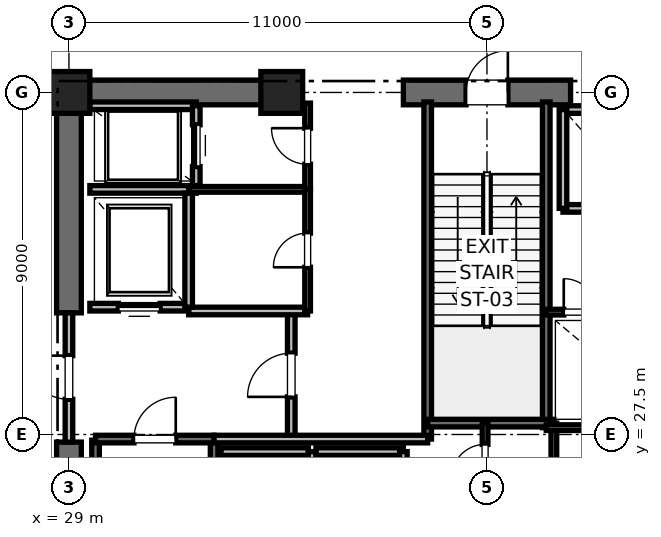
"""IFC4 building model, lengths in metres.
Left out: names, types, materials, properties, quantities, classifications, styles, units other than length and angle.
Written with IfcOpenShell. Run it as: python <this file> out.ifc"""

import sys

from ifc_helpers import new_model, si_unit, direction, frame, frame_2d, origin, origin_2d, place, context, subcontext, project, spatial, rectangle, extrude, element, fill, save


model = new_model("IFC4")
c1 = context("Model", 3, precision=1e-05, world=origin(), true_north=direction((0.0, 1.0)))
c2 = subcontext(c1, "Body", "Model", "MODEL_VIEW")
j1 = project(units=[si_unit("LENGTHUNIT", "METRE"), si_unit("PLANEANGLEUNIT", "RADIAN")], contexts=[c1])
p1 = place(None, origin())
s1 = spatial("IfcSite", under=j1, at=p1, CompositionType="ELEMENT")
p2 = place(p1, origin())
s2 = spatial("IfcBuilding", under=s1, at=p2, CompositionType="ELEMENT")
p3 = place(p2, frame((0.0, 0.0, 6.0)))
s3 = spatial("IfcBuildingStorey", under=s2, at=p3, CompositionType="ELEMENT", Elevation=6.0)
for number, where, z_axis, x_axis in (
    (1, (29.0, 36.5, 0.0), (0.0, 0.0, 1.0), (1.0, 0.0, 0.0)),
    (2, (34.6, 36.5, 0.0), (0.0, 0.0, 1.0), (1.0, 0.0, 0.0)),
):
    element("IfcColumn", number, at=place(p3, frame(where, z_axis=z_axis, x_axis=x_axis)), inside=s3, PredefinedType="PILASTER", context=c2, shape_type="SweptSolid", body=[
        extrude(rectangle(XDim=1.1, YDim=1.1, at=origin_2d()), origin(), (0.0, 0.0, 1.0), 5.2),
    ])
p4 = place(p3, frame((29.0, 36.5, 0.0), z_axis=(0.0, 0.0, 1.0), x_axis=(1.0, 0.0, 0.0)))
e3 = element("IfcWall", 3, at=p4, inside=s3, PredefinedType="SHEAR", context=c2, shape_type="SweptSolid", body=[
    extrude(rectangle(XDim=5.8, YDim=0.65, at=frame_2d((2.9, 0.0))), origin(), (0.0, 0.0, 1.0), 4.92),
])
p5 = place(p3, frame((37.8, 36.5, 0.0), z_axis=(0.0, 0.0, 1.0), x_axis=(1.0, 0.0, 0.0)))
e4 = element("IfcWall", 4, at=p5, inside=s3, PredefinedType="SHEAR", context=c2, shape_type="SweptSolid", body=[
    extrude(rectangle(XDim=4.4, YDim=0.65, at=frame_2d((2.2, 0.0))), origin(), (0.0, 0.0, 1.0), 4.92),
])
p6 = place(p5, frame((1.65, 0.0, 0.0)))
e5 = element("IfcOpeningElement", 5, at=p6, cuts=e4, PredefinedType="OPENING", context=c2, shape_type="SweptSolid", body=[
    extrude(rectangle(XDim=1.1, YDim=2.15, at=frame_2d((0.55, 1.075))), frame((0.0, 0.325, 0.0), z_axis=(0.0, -1.0, 0.0), x_axis=(1.0, 0.0, 0.0)), (0.0, 0.0, 1.0), 0.65),
])
p7 = place(p3, frame((29.0, 18.5, 0.0), z_axis=(0.0, 0.0, 1.0), x_axis=(0.0, 1.0, 0.0)))
e6 = element("IfcWall", 6, at=p7, inside=s3, PredefinedType="SHEAR", context=c2, shape_type="SweptSolid", body=[
    extrude(rectangle(XDim=8.8, YDim=0.65, at=frame_2d((4.4, 0.0))), origin(), (0.0, 0.0, 1.0), 4.92),
])
p8 = place(p3, frame((29.0, 30.7, 0.0), z_axis=(0.0, 0.0, 1.0), x_axis=(0.0, 1.0, 0.0)))
e7 = element("IfcWall", 7, at=p8, inside=s3, PredefinedType="SHEAR", context=c2, shape_type="SweptSolid", body=[
    extrude(rectangle(XDim=5.8, YDim=0.65, at=frame_2d((2.9, 0.0))), origin(), (0.0, 0.0, 1.0), 4.92),
])
p9 = place(p3, frame((29.7, 19.2, 0.0), z_axis=(0.0, 0.0, 1.0), x_axis=(0.0, 1.0, 0.0)))
e8 = element("IfcWall", 8, at=p9, inside=s3, PredefinedType="SOLIDWALL", context=c2, shape_type="SweptSolid", body=[
    extrude(rectangle(XDim=8.15, YDim=0.2, at=frame_2d((4.075, 0.0))), origin(), (0.0, 0.0, 1.0), 4.92),
])
p10 = place(p3, frame((32.82, 18.6, 0.0), z_axis=(0.0, 0.0, 1.0), x_axis=(0.0, 1.0, 0.0)))
e9 = element("IfcWall", 9, at=p10, inside=s3, PredefinedType="SOLIDWALL", context=c2, shape_type="SweptSolid", body=[
    extrude(rectangle(XDim=8.78, YDim=0.2, at=frame_2d((4.39, 0.0))), origin(), (0.0, 0.0, 1.0), 4.92),
])
p11 = place(p3, frame((29.7, 27.38, 0.0), z_axis=(0.0, 0.0, 1.0), x_axis=(1.0, 0.0, 0.0)))
e10 = element("IfcWall", 10, at=p11, inside=s3, PredefinedType="SOLIDWALL", context=c2, shape_type="SweptSolid", body=[
    extrude(rectangle(XDim=3.12, YDim=0.2, at=frame_2d((1.56, 0.0))), origin(), (0.0, 0.0, 1.0), 4.92),
])
p12 = place(p11, frame((1.01, 0.0, 0.0)))
e11 = element("IfcOpeningElement", 11, at=p12, cuts=e10, PredefinedType="OPENING", context=c2, shape_type="SweptSolid", body=[
    extrude(rectangle(XDim=1.1, YDim=2.15, at=frame_2d((0.55, 1.075))), frame((0.0, 0.1, 0.0), z_axis=(0.0, -1.0, 0.0), x_axis=(1.0, 0.0, 0.0)), (0.0, 0.0, 1.0), 0.2),
])
p13 = place(p3, frame((38.44, 27.38, 0.0), z_axis=(0.0, 0.0, 1.0), x_axis=(0.0, 1.0, 0.0)))
e12 = element("IfcWall", 12, at=p13, inside=s3, PredefinedType="SOLIDWALL", context=c2, shape_type="SweptSolid", body=[
    extrude(rectangle(XDim=8.87, YDim=0.2, at=frame_2d((4.435, 0.0))), origin(), (0.0, 0.0, 1.0), 4.92),
])
p14 = place(p3, frame((41.56, 27.68, 0.0), z_axis=(0.0, 0.0, 1.0), x_axis=(0.0, 1.0, 0.0)))
e13 = element("IfcWall", 13, at=p14, inside=s3, PredefinedType="SOLIDWALL", context=c2, shape_type="SweptSolid", body=[
    extrude(rectangle(XDim=8.57, YDim=0.2, at=frame_2d((4.285, 0.0))), origin(), (0.0, 0.0, 1.0), 4.92),
])
p15 = place(p3, frame((38.44, 27.8, 0.0), z_axis=(0.0, 0.0, 1.0), x_axis=(1.0, 0.0, 0.0)))
e14 = element("IfcWall", 14, at=p15, inside=s3, PredefinedType="SOLIDWALL", context=c2, shape_type="SweptSolid", body=[
    extrude(rectangle(XDim=3.32, YDim=0.2, at=frame_2d((1.66, 0.0))), origin(), (0.0, 0.0, 1.0), 4.92),
])
p16 = place(p3, frame((34.85, 27.38, 0.0), z_axis=(0.0, 0.0, 1.0), x_axis=(0.0, 1.0, 0.0)))
e15 = element("IfcWall", 15, at=p16, inside=s3, PredefinedType="PARTITIONING", context=c2, shape_type="SweptSolid", body=[
    extrude(rectangle(XDim=3.37, YDim=0.2, at=frame_2d((1.685, 0.0))), origin(), (0.0, 0.0, 1.0), 4.92),
])
p17 = place(p16, frame((1.11, 0.0, 0.0)))
e16 = element("IfcOpeningElement", 16, at=p17, cuts=e15, PredefinedType="OPENING", context=c2, shape_type="SweptSolid", body=[
    extrude(rectangle(XDim=1.15, YDim=2.2, at=frame_2d((0.575, 1.1))), frame((0.0, 0.1, 0.0), z_axis=(0.0, -1.0, 0.0), x_axis=(1.0, 0.0, 0.0)), (0.0, 0.0, 1.0), 0.2),
])
p18 = place(p3, frame((29.0, 27.3, 0.0), z_axis=(0.0, 0.0, 1.0), x_axis=(0.0, 1.0, 0.0)))
e17 = element("IfcWall", 17, at=p18, inside=s3, PredefinedType="PARTITIONING", context=c2, shape_type="SweptSolid", body=[
    extrude(rectangle(XDim=3.4, YDim=0.2, at=frame_2d((1.7, 0.0))), origin(), (0.0, 0.0, 1.0), 3.7),
])
p19 = place(p18, frame((1.125, 0.0, 0.0)))
e18 = element("IfcOpeningElement", 18, at=p19, cuts=e17, PredefinedType="OPENING", context=c2, shape_type="SweptSolid", body=[
    extrude(rectangle(XDim=1.15, YDim=2.2, at=frame_2d((0.575, 1.1))), frame((0.0, 0.1, 0.0), z_axis=(0.0, -1.0, 0.0), x_axis=(1.0, 0.0, 0.0)), (0.0, 0.0, 1.0), 0.2),
])
p20 = place(p3, frame((32.82, 27.38, 0.0), z_axis=(0.0, 0.0, 1.0), x_axis=(1.0, 0.0, 0.0)))
e19 = element("IfcWall", 19, at=p20, inside=s3, PredefinedType="PARTITIONING", context=c2, shape_type="SweptSolid", body=[
    extrude(rectangle(XDim=5.62, YDim=0.2, at=frame_2d((2.81, 0.0))), origin(), (0.0, 0.0, 1.0), 4.92),
])
p21 = place(p3, frame((32.15, 30.75, 0.0), z_axis=(0.0, 0.0, 1.0), x_axis=(1.0, 0.0, 0.0)))
e20 = element("IfcWall", 20, at=p21, inside=s3, PredefinedType="PARTITIONING", context=c2, shape_type="SweptSolid", body=[
    extrude(rectangle(XDim=3.13, YDim=0.2, at=frame_2d((1.565, 0.0))), origin(), (0.0, 0.0, 1.0), 4.92),
])
p22 = place(p3, frame((29.55, 30.85, 0.0), z_axis=(0.0, 0.0, 1.0), x_axis=(1.0, 0.0, 0.0)))
e21 = element("IfcWall", 21, at=p22, inside=s3, PredefinedType="SOLIDWALL", context=c2, shape_type="SweptSolid", body=[
    extrude(rectangle(XDim=2.6, YDim=0.2, at=frame_2d((1.3, 0.0))), origin(), (0.0, 0.0, 1.0), 3.7),
])
p23 = place(p22, frame((0.75, 0.0, 0.0)))
e22 = element("IfcOpeningElement", 22, at=p23, cuts=e21, PredefinedType="OPENING", context=c2, shape_type="SweptSolid", body=[
    extrude(rectangle(XDim=1.1, YDim=2.2, at=frame_2d((0.55, 1.1))), frame((0.0, 0.1, 0.0), z_axis=(0.0, -1.0, 0.0), x_axis=(1.0, 0.0, 0.0)), (0.0, 0.0, 1.0), 0.2),
])
p24 = place(p3, frame((29.55, 33.95, 0.0), z_axis=(0.0, 0.0, 1.0), x_axis=(1.0, 0.0, 0.0)))
e23 = element("IfcWall", 23, at=p24, inside=s3, PredefinedType="SOLIDWALL", context=c2, shape_type="SweptSolid", body=[
    extrude(rectangle(XDim=2.8, YDim=0.2, at=frame_2d((1.4, 0.0))), origin(), (0.0, 0.0, 1.0), 4.92),
])
p25 = place(p3, frame((32.15, 30.85, 0.0), z_axis=(0.0, 0.0, 1.0), x_axis=(0.0, 1.0, 0.0)))
e24 = element("IfcWall", 24, at=p25, inside=s3, PredefinedType="SOLIDWALL", context=c2, shape_type="SweptSolid", body=[
    extrude(rectangle(XDim=3.0, YDim=0.2, at=frame_2d((1.5, 0.0))), origin(), (0.0, 0.0, 1.0), 4.92),
])
p26 = place(p3, frame((32.35, 36.15, 0.0), z_axis=(0.0, 0.0, 1.0), x_axis=(-1.0, 0.0, 0.0)))
e25 = element("IfcWall", 25, at=p26, inside=s3, PredefinedType="SOLIDWALL", context=c2, shape_type="SweptSolid", body=[
    extrude(rectangle(XDim=2.8, YDim=0.2, at=frame_2d((1.4, 0.0))), origin(), (0.0, 0.0, 1.0), 3.979),
])
p27 = place(p3, frame((32.35, 34.05, 0.0), z_axis=(0.0, 0.0, 1.0), x_axis=(0.0, 1.0, 0.0)))
e26 = element("IfcWall", 26, at=p27, inside=s3, PredefinedType="SOLIDWALL", context=c2, shape_type="SweptSolid", body=[
    extrude(rectangle(XDim=2.1, YDim=0.2, at=frame_2d((1.05, 0.0))), origin(), (0.0, 0.0, 1.0), 4.92),
])
p28 = place(p27, frame((0.5, 0.0, 0.0)))
e27 = element("IfcOpeningElement", 27, at=p28, cuts=e26, PredefinedType="OPENING", context=c2, shape_type="SweptSolid", body=[
    extrude(rectangle(XDim=1.1, YDim=2.2, at=frame_2d((0.55, 1.1))), frame((0.0, 0.1, 0.0), z_axis=(0.0, -1.0, 0.0), x_axis=(1.0, 0.0, 0.0)), (0.0, 0.0, 1.0), 0.2),
])
p29 = place(p3, frame((35.3, 27.05, 0.0), z_axis=(0.0, 0.0, 1.0), x_axis=(-1.0, 0.0, 0.0)))
e28 = element("IfcWall", 28, at=p29, inside=s3, PredefinedType="SOLIDWALL", context=c2, shape_type="SweptSolid", body=[
    extrude(rectangle(XDim=2.3, YDim=0.2, at=frame_2d((1.15, 0.0))), origin(), (0.0, 0.0, 1.0), 4.92),
])
p30 = place(p3, frame((35.4, 24.45, 0.0), z_axis=(0.0, 0.0, 1.0), x_axis=(0.0, 1.0, 0.0)))
e29 = element("IfcWall", 29, at=p30, inside=s3, PredefinedType="SOLIDWALL", context=c2, shape_type="SweptSolid", body=[
    extrude(rectangle(XDim=2.6, YDim=0.2, at=frame_2d((1.3, 0.0))), origin(), (0.0, 0.0, 1.0), 4.92),
])
p31 = place(p3, frame((37.8, 27.05, 0.0), z_axis=(0.0, 0.0, 1.0), x_axis=(-1.0, 0.0, 0.0)))
e30 = element("IfcWall", 30, at=p31, inside=s3, PredefinedType="SOLIDWALL", context=c2, shape_type="SweptSolid", body=[
    extrude(rectangle(XDim=2.3, YDim=0.2, at=frame_2d((1.15, 0.0))), origin(), (0.0, 0.0, 1.0), 4.92),
])
p32 = place(p3, frame((37.8, 24.45, 0.0), z_axis=(0.0, 0.0, 1.0), x_axis=(0.0, 1.0, 0.0)))
e31 = element("IfcWall", 31, at=p32, inside=s3, PredefinedType="SOLIDWALL", context=c2, shape_type="SweptSolid", body=[
    extrude(rectangle(XDim=2.6, YDim=0.2, at=frame_2d((1.3, 0.0))), origin(), (0.0, 0.0, 1.0), 4.92),
])
p33 = place(p3, frame((42.0, 33.45, 0.0), z_axis=(0.0, 0.0, 1.0), x_axis=(1.0, 0.0, 0.0)))
e32 = element("IfcWall", 32, at=p33, inside=s3, PredefinedType="SOLIDWALL", context=c2, shape_type="SweptSolid", body=[
    extrude(rectangle(XDim=2.3, YDim=0.2, at=frame_2d((1.15, 0.0))), origin(), (0.0, 0.0, 1.0), 4.92),
])
p34 = place(p3, frame((44.3, 36.05, 0.0), z_axis=(0.0, 0.0, 1.0), x_axis=(-1.0, 0.0, 0.0)))
e33 = element("IfcWall", 33, at=p34, inside=s3, PredefinedType="SOLIDWALL", context=c2, shape_type="SweptSolid", body=[
    extrude(rectangle(XDim=2.3, YDim=0.2, at=frame_2d((1.15, 0.0))), origin(), (0.0, 0.0, 1.0), 3.7),
])
p35 = place(p3, frame((42.0, 36.05, 0.0), z_axis=(0.0, 0.0, 1.0), x_axis=(0.0, -1.0, 0.0)))
e34 = element("IfcWall", 34, at=p35, inside=s3, PredefinedType="SOLIDWALL", context=c2, shape_type="SweptSolid", body=[
    extrude(rectangle(XDim=2.6, YDim=0.2, at=frame_2d((1.3, 0.0))), origin(), (0.0, 0.0, 1.0), 3.7),
])
p36 = place(p3, frame((41.76, 23.8, 0.0), z_axis=(0.0, 0.0, 1.0), x_axis=(0.0, 1.0, 0.0)))
e35 = element("IfcWall", 35, at=p36, inside=s3, PredefinedType="PARTITIONING", context=c2, shape_type="SweptSolid", body=[
    extrude(rectangle(XDim=4.0, YDim=0.15, at=frame_2d((2.0, 0.0))), origin(), (0.0, 0.0, 1.0), 2.85),
])
p37 = place(p3, frame((39.95, 25.8, 0.0), z_axis=(0.0, 0.0, 1.0), x_axis=(0.0, 1.0, 0.0)))
e36 = element("IfcWall", 36, at=p37, inside=s3, PredefinedType="PARTITIONING", context=c2, shape_type="SweptSolid", body=[
    extrude(rectangle(XDim=2.0, YDim=0.15, at=frame_2d((1.0, 0.0))), origin(), (0.0, 0.0, 1.0), 2.85),
])
p38 = place(p37, frame((0.56, 0.0, 0.0)))
e37 = element("IfcOpeningElement", 37, at=p38, cuts=e36, PredefinedType="OPENING", context=c2, shape_type="SweptSolid", body=[
    extrude(rectangle(XDim=0.88, YDim=2.1, at=frame_2d((0.44, 1.05))), frame((0.0, 0.075, 0.0), z_axis=(0.0, -1.0, 0.0), x_axis=(1.0, 0.0, 0.0)), (0.0, 0.0, 1.0), 0.15),
])
p39 = place(p3, frame((32.15, 33.95, 0.0), z_axis=(0.0, 0.0, 1.0), x_axis=(1.0, 0.0, 0.0)))
e38 = element("IfcWall", 38, at=p39, inside=s3, PredefinedType="PARTITIONING", context=c2, shape_type="SweptSolid", body=[
    extrude(rectangle(XDim=3.13, YDim=0.15, at=frame_2d((1.565, 0.0))), origin(), (0.0, 0.0, 1.0), 2.85),
])
p40 = place(p3, frame((35.28, 33.95, 0.0), z_axis=(0.0, 0.0, 1.0), x_axis=(0.0, 1.0, 0.0)))
e39 = element("IfcWall", 39, at=p40, inside=s3, PredefinedType="PARTITIONING", context=c2, shape_type="SweptSolid", body=[
    extrude(rectangle(XDim=2.27, YDim=0.15, at=frame_2d((1.135, 0.0))), origin(), (0.0, 0.0, 1.0), 2.85),
])
p41 = place(p40, frame((0.66, 0.0, 0.0)))
e40 = element("IfcOpeningElement", 40, at=p41, cuts=e39, PredefinedType="OPENING", context=c2, shape_type="SweptSolid", body=[
    extrude(rectangle(XDim=0.95, YDim=2.15, at=frame_2d((0.475, 1.075))), frame((0.0, 0.075, 0.0), z_axis=(0.0, -1.0, 0.0), x_axis=(1.0, 0.0, 0.0)), (0.0, 0.0, 1.0), 0.15),
])
p42 = place(p3, frame((35.28, 30.75, 0.0), z_axis=(0.0, 0.0, 1.0), x_axis=(0.0, 1.0, 0.0)))
e41 = element("IfcWall", 41, at=p42, inside=s3, PredefinedType="PARTITIONING", context=c2, shape_type="SweptSolid", body=[
    extrude(rectangle(XDim=3.2, YDim=0.15, at=frame_2d((1.6, 0.0))), origin(), (0.0, 0.0, 1.0), 2.85),
])
p43 = place(p42, frame((1.15, 0.0, 0.0)))
e42 = element("IfcOpeningElement", 42, at=p43, cuts=e41, PredefinedType="OPENING", context=c2, shape_type="SweptSolid", body=[
    extrude(rectangle(XDim=0.9, YDim=2.1, at=frame_2d((0.45, 1.05))), frame((0.0, 0.075, 0.0), z_axis=(0.0, -1.0, 0.0), x_axis=(1.0, 0.0, 0.0)), (0.0, 0.0, 1.0), 0.15),
])
p44 = place(p3, frame((41.56, 27.68, 0.0), z_axis=(0.0, 0.0, 1.0), x_axis=(1.0, 0.0, 0.0)))
e43 = element("IfcWall", 43, at=p44, inside=s3, PredefinedType="PARTITIONING", context=c2, shape_type="SweptSolid", body=[
    extrude(rectangle(XDim=3.59, YDim=0.15, at=frame_2d((1.795, 0.0))), origin(), (0.0, 0.0, 1.0), 2.85),
])
p45 = place(p3, frame((41.56, 30.72, 0.0), z_axis=(0.0, 0.0, 1.0), x_axis=(1.0, 0.0, 0.0)))
e44 = element("IfcWall", 44, at=p45, inside=s3, PredefinedType="PARTITIONING", context=c2, shape_type="SweptSolid", body=[
    extrude(rectangle(XDim=1.8, YDim=0.15, at=frame_2d((0.9, 0.0))), origin(), (0.0, 0.0, 1.0), 2.85),
])
p46 = place(p45, frame((0.46, 0.0, 0.0)))
e45 = element("IfcOpeningElement", 45, at=p46, cuts=e44, PredefinedType="OPENING", context=c2, shape_type="SweptSolid", body=[
    extrude(rectangle(XDim=0.88, YDim=2.1, at=frame_2d((0.44, 1.05))), frame((0.0, 0.075, 0.0), z_axis=(0.0, -1.0, 0.0), x_axis=(1.0, 0.0, 0.0)), (0.0, 0.0, 1.0), 0.15),
])
p47 = place(p12, origin())
e46 = element("IfcDoor", 46, at=p47, inside=s3, OperationType="SINGLE_SWING_RIGHT", PredefinedType="DOOR", context=c2, shape_type="SweptSolid", body=[
    extrude(rectangle(XDim=1.1, YDim=2.15, at=frame_2d((0.55, 1.075))), frame((0.0, 0.025, 0.0), z_axis=(0.0, -1.0, 0.0), x_axis=(1.0, 0.0, 0.0)), (0.0, 0.0, 1.0), 0.05),
])
fill(e11, e46)
p48 = place(p6, origin())
e47 = element("IfcDoor", 47, at=p48, inside=s3, OperationType="SINGLE_SWING_RIGHT", PredefinedType="DOOR", context=c2, shape_type="SweptSolid", body=[
    extrude(rectangle(XDim=1.1, YDim=2.15, at=frame_2d((0.55, 1.075))), frame((0.0, 0.025, 0.0), z_axis=(0.0, -1.0, 0.0), x_axis=(1.0, 0.0, 0.0)), (0.0, 0.0, 1.0), 0.05),
])
fill(e5, e47)
p49 = place(p17, origin())
e48 = element("IfcDoor", 48, at=p49, inside=s3, OperationType="SINGLE_SWING_LEFT", PredefinedType="DOOR", context=c2, shape_type="SweptSolid", body=[
    extrude(rectangle(XDim=1.15, YDim=2.2, at=frame_2d((0.575, 1.1))), frame((0.0, 0.025, 0.0), z_axis=(0.0, -1.0, 0.0), x_axis=(1.0, 0.0, 0.0)), (0.0, 0.0, 1.0), 0.05),
])
fill(e16, e48)
p50 = place(p19, origin())
e49 = element("IfcDoor", 49, at=p50, inside=s3, OperationType="SINGLE_SWING_RIGHT", PredefinedType="DOOR", context=c2, shape_type="SweptSolid", body=[
    extrude(rectangle(XDim=1.15, YDim=2.2, at=frame_2d((0.575, 1.1))), frame((0.0, 0.025, 0.0), z_axis=(0.0, -1.0, 0.0), x_axis=(1.0, 0.0, 0.0)), (0.0, 0.0, 1.0), 0.05),
])
fill(e18, e49)
p51 = place(p23, origin())
e50 = element("IfcDoor", 50, at=p51, inside=s3, OperationType="SLIDING_TO_RIGHT", PredefinedType="DOOR", context=c2, shape_type="SweptSolid", body=[
    extrude(rectangle(XDim=1.1, YDim=2.2, at=frame_2d((0.55, 1.1))), frame((0.0, 0.025, 0.0), z_axis=(0.0, -1.0, 0.0), x_axis=(1.0, 0.0, 0.0)), (0.0, 0.0, 1.0), 0.05),
])
fill(e22, e50)
p52 = place(p28, origin())
e51 = element("IfcDoor", 51, at=p52, inside=s3, OperationType="SLIDING_TO_RIGHT", PredefinedType="DOOR", context=c2, shape_type="SweptSolid", body=[
    extrude(rectangle(XDim=1.1, YDim=2.2, at=frame_2d((0.55, 1.1))), frame((0.0, 0.025, 0.0), z_axis=(0.0, -1.0, 0.0), x_axis=(1.0, 0.0, 0.0)), (0.0, 0.0, 1.0), 0.05),
])
fill(e27, e51)
p53 = place(p38, origin())
e52 = element("IfcDoor", 52, at=p53, inside=s3, OperationType="SINGLE_SWING_LEFT", PredefinedType="DOOR", context=c2, shape_type="SweptSolid", body=[
    extrude(rectangle(XDim=0.88, YDim=2.1, at=frame_2d((0.44, 1.05))), frame((0.0, 0.025, 0.0), z_axis=(0.0, -1.0, 0.0), x_axis=(1.0, 0.0, 0.0)), (0.0, 0.0, 1.0), 0.05),
])
fill(e37, e52)
p54 = place(p41, origin())
e53 = element("IfcDoor", 53, at=p54, inside=s3, OperationType="SINGLE_SWING_RIGHT", PredefinedType="DOOR", context=c2, shape_type="SweptSolid", body=[
    extrude(rectangle(XDim=0.95, YDim=2.15, at=frame_2d((0.475, 1.075))), frame((0.0, 0.025, 0.0), z_axis=(0.0, -1.0, 0.0), x_axis=(1.0, 0.0, 0.0)), (0.0, 0.0, 1.0), 0.05),
])
fill(e40, e53)
p55 = place(p43, origin())
e54 = element("IfcDoor", 54, at=p55, inside=s3, OperationType="SINGLE_SWING_LEFT", PredefinedType="DOOR", context=c2, shape_type="SweptSolid", body=[
    extrude(rectangle(XDim=0.9, YDim=2.1, at=frame_2d((0.45, 1.05))), frame((0.0, 0.025, 0.0), z_axis=(0.0, -1.0, 0.0), x_axis=(1.0, 0.0, 0.0)), (0.0, 0.0, 1.0), 0.05),
])
fill(e42, e54)
p56 = place(p46, origin())
e55 = element("IfcDoor", 55, at=p56, inside=s3, OperationType="SINGLE_SWING_LEFT", PredefinedType="DOOR", context=c2, shape_type="SweptSolid", body=[
    extrude(rectangle(XDim=0.88, YDim=2.1, at=frame_2d((0.44, 1.05))), frame((0.0, 0.025, 0.0), z_axis=(0.0, -1.0, 0.0), x_axis=(1.0, 0.0, 0.0)), (0.0, 0.0, 1.0), 0.05),
])
fill(e45, e55)
save(model, sys.argv[1])
